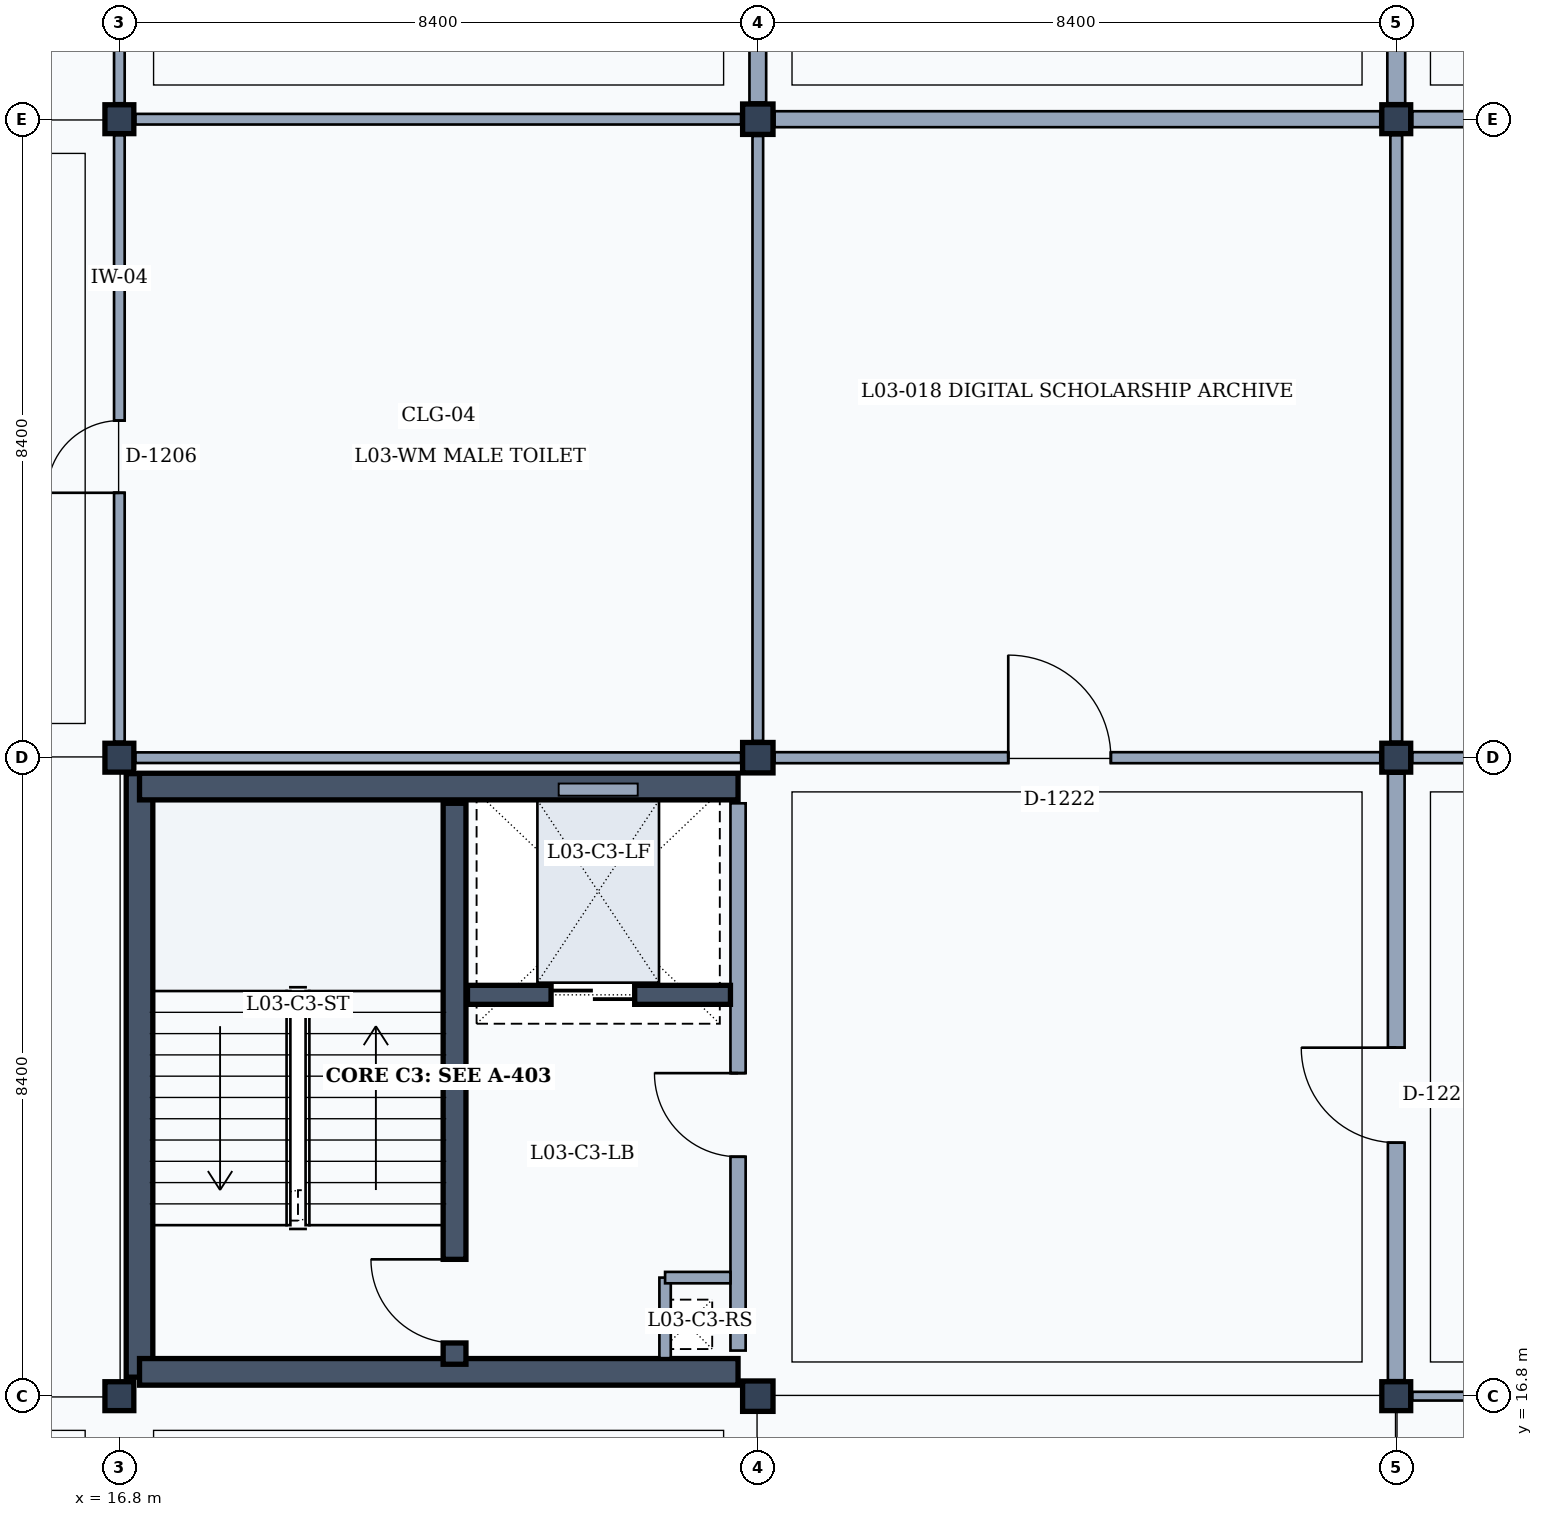
"""IFC4 building model, lengths in metres.
Left out: names, types, materials, properties, quantities, classifications, styles, units other than length and angle.
Written with IfcOpenShell. Run it as: python <this file> out.ifc"""

import sys

from ifc_helpers import new_model, si_unit, direction, frame, frame_2d, origin, origin_2d, place, context, subcontext, project, spatial, rectangle, extrude, element, fill, save


model = new_model("IFC4")
c1 = context("Model", 3, precision=1e-05, world=origin(), true_north=direction((0.0, 1.0)))
c2 = subcontext(c1, "Body", "Model", "MODEL_VIEW")
j1 = project(units=[si_unit("LENGTHUNIT", "METRE"), si_unit("PLANEANGLEUNIT", "RADIAN")], contexts=[c1])
p1 = place(None, origin())
s1 = spatial("IfcSite", under=j1, at=p1, CompositionType="ELEMENT")
p2 = place(p1, origin())
s2 = spatial("IfcBuilding", under=s1, at=p2, CompositionType="ELEMENT")
p3 = place(p2, frame((0.0, 0.0, 13.8)))
s3 = spatial("IfcBuildingStorey", under=s2, at=p3, CompositionType="ELEMENT", Elevation=13.8)
for number, where, z_axis, x_axis in (
    (1, (16.8, 16.8, 0.0), (0.0, 0.0, 1.0), (1.0, 0.0, 0.0)),
    (2, (16.8, 25.2, 0.0), (0.0, 0.0, 1.0), (1.0, 0.0, 0.0)),
    (3, (16.8, 33.6, 0.0), (0.0, 0.0, 1.0), (1.0, 0.0, 0.0)),
):
    element("IfcColumn", number, at=place(p3, frame(where, z_axis=z_axis, x_axis=x_axis)), inside=s3, PredefinedType="COLUMN", context=c2, shape_type="SweptSolid", body=[
        extrude(rectangle(XDim=0.38, YDim=0.38, at=origin_2d()), origin(), (0.0, 0.0, 1.0), 4.2),
    ])
for number, where, z_axis, x_axis in (
    (4, (25.2, 16.8, 0.0), (0.0, 0.0, 1.0), (1.0, 0.0, 0.0)),
    (5, (25.2, 25.2, 0.0), (0.0, 0.0, 1.0), (1.0, 0.0, 0.0)),
    (6, (25.2, 33.6, 0.0), (0.0, 0.0, 1.0), (1.0, 0.0, 0.0)),
):
    element("IfcColumn", number, at=place(p3, frame(where, z_axis=z_axis, x_axis=x_axis)), inside=s3, PredefinedType="COLUMN", context=c2, shape_type="SweptSolid", body=[
        extrude(rectangle(XDim=0.4, YDim=0.4, at=origin_2d()), origin(), (0.0, 0.0, 1.0), 4.2),
    ])
for number, where, z_axis, x_axis in (
    (7, (33.6, 16.8, 0.0), (0.0, 0.0, 1.0), (1.0, 0.0, 0.0)),
    (8, (33.6, 25.2, 0.0), (0.0, 0.0, 1.0), (1.0, 0.0, 0.0)),
    (9, (33.6, 33.6, 0.0), (0.0, 0.0, 1.0), (1.0, 0.0, 0.0)),
):
    element("IfcColumn", number, at=place(p3, frame(where, z_axis=z_axis, x_axis=x_axis)), inside=s3, PredefinedType="COLUMN", context=c2, shape_type="SweptSolid", body=[
        extrude(rectangle(XDim=0.38, YDim=0.38, at=origin_2d()), origin(), (0.0, 0.0, 1.0), 4.2),
    ])
p4 = place(p3, frame((17.065, 17.05, 0.0), z_axis=(0.0, 0.0, 1.0), x_axis=(0.0, 1.0, 0.0)))
e10 = element("IfcWall", 10, at=p4, inside=s3, PredefinedType="SHEAR", context=c2, shape_type="SweptSolid", body=[
    extrude(rectangle(XDim=7.94, YDim=0.35, at=frame_2d((3.97, 0.0))), origin(), (0.0, 0.0, 1.0), 3.93),
])
p5 = place(p3, frame((17.065, 24.82, 0.0), z_axis=(0.0, 0.0, 1.0), x_axis=(1.0, 0.0, 0.0)))
e11 = element("IfcWall", 11, at=p5, inside=s3, PredefinedType="SHEAR", context=c2, shape_type="SweptSolid", body=[
    extrude(rectangle(XDim=7.875, YDim=0.35, at=frame_2d((3.938, 0.0))), origin(), (0.0, 0.0, 1.0), 3.93),
])
p6 = place(p3, frame((24.94, 24.6, 0.0), z_axis=(0.0, 0.0, 1.0), x_axis=(0.0, -1.0, 0.0)))
e12 = element("IfcWall", 12, at=p6, inside=s3, PredefinedType="PARTITIONING", context=c2, shape_type="SweptSolid", body=[
    extrude(rectangle(XDim=7.2, YDim=0.2, at=frame_2d((3.6, 0.0))), origin(), (0.0, 0.0, 1.0), 3.32),
])
p7 = place(p6, frame((3.55, 0.0, 0.0)))
e13 = element("IfcOpeningElement", 13, at=p7, cuts=e12, PredefinedType="OPENING", context=c2, shape_type="SweptSolid", body=[
    extrude(rectangle(XDim=1.1, YDim=2.15, at=frame_2d((0.55, 1.075))), frame((0.0, 0.11, 0.0), z_axis=(0.0, -1.0, 0.0), x_axis=(1.0, 0.0, 0.0)), (0.0, 0.0, 1.0), 0.22),
])
p8 = place(p3, frame((24.94, 17.12, 0.0), z_axis=(0.0, 0.0, 1.0), x_axis=(-1.0, 0.0, 0.0)))
e14 = element("IfcWall", 14, at=p8, inside=s3, PredefinedType="SHEAR", context=c2, shape_type="SweptSolid", body=[
    extrude(rectangle(XDim=7.875, YDim=0.35, at=frame_2d((3.938, 0.0))), origin(), (0.0, 0.0, 1.0), 3.93),
])
p9 = place(p3, frame((21.21, 17.22, 0.0), z_axis=(0.0, 0.0, 1.0), x_axis=(0.0, 1.0, 0.0)))
e15 = element("IfcWall", 15, at=p9, inside=s3, PredefinedType="SHEAR", context=c2, shape_type="SweptSolid", body=[
    extrude(rectangle(XDim=7.38, YDim=0.3, at=frame_2d((3.69, 0.0))), origin(), (0.0, 0.0, 1.0), 3.93),
])
p10 = place(p9, frame((0.28, 0.0, 0.0)))
e16 = element("IfcOpeningElement", 16, at=p10, cuts=e15, PredefinedType="OPENING", context=c2, shape_type="SweptSolid", body=[
    extrude(rectangle(XDim=1.1, YDim=2.15, at=frame_2d((0.55, 1.075))), frame((0.0, 0.16, 0.0), z_axis=(0.0, -1.0, 0.0), x_axis=(1.0, 0.0, 0.0)), (0.0, 0.0, 1.0), 0.32),
])
p11 = place(p3, frame((23.98, 18.36, 0.0), z_axis=(0.0, 0.0, 1.0), x_axis=(0.0, -1.0, 0.0)))
e17 = element("IfcWall", 17, at=p11, inside=s3, PredefinedType="PARTITIONING", context=c2, shape_type="SweptSolid", body=[
    extrude(rectangle(XDim=1.06, YDim=0.15, at=frame_2d((0.53, 0.0))), origin(), (0.0, 0.0, 1.0), 3.32),
])
p12 = place(p3, frame((23.98, 18.36, 0.0), z_axis=(0.0, 0.0, 1.0), x_axis=(1.0, 0.0, 0.0)))
e18 = element("IfcWall", 18, at=p12, inside=s3, PredefinedType="PARTITIONING", context=c2, shape_type="SweptSolid", body=[
    extrude(rectangle(XDim=0.86, YDim=0.15, at=frame_2d((0.43, 0.0))), origin(), (0.0, 0.0, 1.0), 3.32),
])
p13 = place(p3, frame((21.38, 22.08, 0.0), z_axis=(0.0, 0.0, 1.0), x_axis=(1.0, 0.0, 0.0)))
e19 = element("IfcWall", 19, at=p13, inside=s3, PredefinedType="SHEAR", context=c2, shape_type="SweptSolid", body=[
    extrude(rectangle(XDim=3.46, YDim=0.25, at=frame_2d((1.73, 0.0))), origin(), (0.0, 0.0, 1.0), 3.93),
])
p14 = place(p13, frame((1.1, 0.0, 0.0)))
e20 = element("IfcOpeningElement", 20, at=p14, cuts=e19, PredefinedType="OPENING", context=c2, shape_type="SweptSolid", body=[
    extrude(rectangle(XDim=1.1, YDim=2.15, at=frame_2d((0.55, 1.075))), frame((0.0, 0.135, 0.0), z_axis=(0.0, -1.0, 0.0), x_axis=(1.0, 0.0, 0.0)), (0.0, 0.0, 1.0), 0.27),
])
p15 = place(p3, frame((16.8, 25.41, 0.0), z_axis=(0.0, 0.0, 1.0), x_axis=(0.0, 1.0, 0.0)))
e21 = element("IfcWall", 21, at=p15, inside=s3, PredefinedType="PARTITIONING", context=c2, shape_type="SweptSolid", body=[
    extrude(rectangle(XDim=7.98, YDim=0.14, at=frame_2d((3.99, 0.0))), origin(), (0.0, 0.0, 1.0), 3.32),
])
p16 = place(p15, frame((3.275, 0.0, 0.0)))
e22 = element("IfcOpeningElement", 22, at=p16, cuts=e21, PredefinedType="OPENING", context=c2, shape_type="SweptSolid", body=[
    extrude(rectangle(XDim=0.95, YDim=2.15, at=frame_2d((0.475, 1.075))), frame((0.0, 0.08, 0.0), z_axis=(0.0, -1.0, 0.0), x_axis=(1.0, 0.0, 0.0)), (0.0, 0.0, 1.0), 0.16),
])
p17 = place(p3, frame((16.8, 33.81, 0.0), z_axis=(0.0, 0.0, 1.0), x_axis=(0.0, 1.0, 0.0)))
e23 = element("IfcWall", 23, at=p17, inside=s3, PredefinedType="PARTITIONING", context=c2, shape_type="SweptSolid", body=[
    extrude(rectangle(XDim=8.0, YDim=0.14, at=frame_2d((4.0, 0.0))), origin(), (0.0, 0.0, 1.0), 3.32),
])
p18 = place(p17, frame((3.25, 0.0, 0.0)))
e24 = element("IfcOpeningElement", 24, at=p18, cuts=e23, PredefinedType="OPENING", context=c2, shape_type="SweptSolid", body=[
    extrude(rectangle(XDim=1.0, YDim=2.15, at=frame_2d((0.5, 1.075))), frame((0.0, 0.08, 0.0), z_axis=(0.0, -1.0, 0.0), x_axis=(1.0, 0.0, 0.0)), (0.0, 0.0, 1.0), 0.16),
])
p19 = place(p3, frame((17.01, 25.2, 0.0), z_axis=(0.0, 0.0, 1.0), x_axis=(1.0, 0.0, 0.0)))
e25 = element("IfcWall", 25, at=p19, inside=s3, PredefinedType="PARTITIONING", context=c2, shape_type="SweptSolid", body=[
    extrude(rectangle(XDim=7.97, YDim=0.14, at=frame_2d((3.985, 0.0))), origin(), (0.0, 0.0, 1.0), 3.32),
])
p20 = place(p3, frame((25.2, 25.42, 0.0), z_axis=(0.0, 0.0, 1.0), x_axis=(0.0, 1.0, 0.0)))
e26 = element("IfcWall", 26, at=p20, inside=s3, PredefinedType="PARTITIONING", context=c2, shape_type="SweptSolid", body=[
    extrude(rectangle(XDim=7.96, YDim=0.14, at=frame_2d((3.98, 0.0))), origin(), (0.0, 0.0, 1.0), 3.32),
])
p21 = place(p3, frame((17.01, 33.6, 0.0), z_axis=(0.0, 0.0, 1.0), x_axis=(1.0, 0.0, 0.0)))
e27 = element("IfcWall", 27, at=p21, inside=s3, PredefinedType="PARTITIONING", context=c2, shape_type="SweptSolid", body=[
    extrude(rectangle(XDim=7.97, YDim=0.14, at=frame_2d((3.985, 0.0))), origin(), (0.0, 0.0, 1.0), 3.32),
])
p22 = place(p3, frame((25.2, 33.82, 0.0), z_axis=(0.0, 0.0, 1.0), x_axis=(0.0, 1.0, 0.0)))
e28 = element("IfcWall", 28, at=p22, inside=s3, PredefinedType="PARTITIONING", context=c2, shape_type="SweptSolid", body=[
    extrude(rectangle(XDim=7.99, YDim=0.22, at=frame_2d((3.995, 0.0))), origin(), (0.0, 0.0, 1.0), 3.32),
])
p23 = place(p22, frame((3.0, 0.0, 0.0)))
e29 = element("IfcOpeningElement", 29, at=p23, cuts=e28, PredefinedType="OPENING", context=c2, shape_type="SweptSolid", body=[
    extrude(rectangle(XDim=1.5, YDim=2.3, at=frame_2d((0.75, 1.15))), frame((0.0, 0.12, 0.0), z_axis=(0.0, -1.0, 0.0), x_axis=(1.0, 0.0, 0.0)), (0.0, 0.0, 1.0), 0.24),
])
p24 = place(p3, frame((33.6, 17.01, 0.0), z_axis=(0.0, 0.0, 1.0), x_axis=(0.0, 1.0, 0.0)))
e30 = element("IfcWall", 30, at=p24, inside=s3, PredefinedType="PARTITIONING", context=c2, shape_type="SweptSolid", body=[
    extrude(rectangle(XDim=7.98, YDim=0.22, at=frame_2d((3.99, 0.0))), origin(), (0.0, 0.0, 1.0), 3.32),
])
p25 = place(p24, frame((3.125, 0.0, 0.0)))
e31 = element("IfcOpeningElement", 31, at=p25, cuts=e30, PredefinedType="OPENING", context=c2, shape_type="SweptSolid", body=[
    extrude(rectangle(XDim=1.25, YDim=2.3, at=frame_2d((0.625, 1.15))), frame((0.0, 0.12, 0.0), z_axis=(0.0, -1.0, 0.0), x_axis=(1.0, 0.0, 0.0)), (0.0, 0.0, 1.0), 0.24),
])
p26 = place(p3, frame((25.42, 25.2, 0.0), z_axis=(0.0, 0.0, 1.0), x_axis=(1.0, 0.0, 0.0)))
e32 = element("IfcWall", 32, at=p26, inside=s3, PredefinedType="PARTITIONING", context=c2, shape_type="SweptSolid", body=[
    extrude(rectangle(XDim=7.97, YDim=0.145, at=frame_2d((3.985, 0.0))), origin(), (0.0, 0.0, 1.0), 3.32),
])
p27 = place(p26, frame((3.075, 0.0, 0.0)))
e33 = element("IfcOpeningElement", 33, at=p27, cuts=e32, PredefinedType="OPENING", context=c2, shape_type="SweptSolid", body=[
    extrude(rectangle(XDim=1.35, YDim=2.25, at=frame_2d((0.675, 1.125))), frame((0.0, 0.083, 0.0), z_axis=(0.0, -1.0, 0.0), x_axis=(1.0, 0.0, 0.0)), (0.0, 0.0, 1.0), 0.165),
])
p28 = place(p3, frame((33.6, 25.41, 0.0), z_axis=(0.0, 0.0, 1.0), x_axis=(0.0, 1.0, 0.0)))
e34 = element("IfcWall", 34, at=p28, inside=s3, PredefinedType="PARTITIONING", context=c2, shape_type="SweptSolid", body=[
    extrude(rectangle(XDim=7.98, YDim=0.155, at=frame_2d((3.99, 0.0))), origin(), (0.0, 0.0, 1.0), 3.32),
])
p29 = place(p3, frame((25.42, 33.6, 0.0), z_axis=(0.0, 0.0, 1.0), x_axis=(1.0, 0.0, 0.0)))
e35 = element("IfcWall", 35, at=p29, inside=s3, PredefinedType="PARTITIONING", context=c2, shape_type="SweptSolid", body=[
    extrude(rectangle(XDim=7.97, YDim=0.21, at=frame_2d((3.985, 0.0))), origin(), (0.0, 0.0, 1.0), 3.32),
])
p30 = place(p3, frame((33.6, 33.81, 0.0), z_axis=(0.0, 0.0, 1.0), x_axis=(0.0, 1.0, 0.0)))
e36 = element("IfcWall", 36, at=p30, inside=s3, PredefinedType="PARTITIONING", context=c2, shape_type="SweptSolid", body=[
    extrude(rectangle(XDim=8.0, YDim=0.235, at=frame_2d((4.0, 0.0))), origin(), (0.0, 0.0, 1.0), 3.32),
])
p31 = place(p30, frame((3.025, 0.0, 0.0)))
e37 = element("IfcOpeningElement", 37, at=p31, cuts=e36, PredefinedType="OPENING", context=c2, shape_type="SweptSolid", body=[
    extrude(rectangle(XDim=1.45, YDim=2.35, at=frame_2d((0.725, 1.175))), frame((0.0, 0.127, 0.0), z_axis=(0.0, -1.0, 0.0), x_axis=(1.0, 0.0, 0.0)), (0.0, 0.0, 1.0), 0.255),
])
p32 = place(p3, frame((33.81, 16.8, 0.0), z_axis=(0.0, 0.0, 1.0), x_axis=(1.0, 0.0, 0.0)))
e38 = element("IfcWall", 38, at=p32, inside=s3, PredefinedType="PARTITIONING", context=c2, shape_type="SweptSolid", body=[
    extrude(rectangle(XDim=7.97, YDim=0.115, at=frame_2d((3.985, 0.0))), origin(), (0.0, 0.0, 1.0), 3.32),
])
p33 = place(p3, frame((33.81, 25.2, 0.0), z_axis=(0.0, 0.0, 1.0), x_axis=(1.0, 0.0, 0.0)))
e39 = element("IfcWall", 39, at=p33, inside=s3, PredefinedType="PARTITIONING", context=c2, shape_type="SweptSolid", body=[
    extrude(rectangle(XDim=7.97, YDim=0.145, at=frame_2d((3.985, 0.0))), origin(), (0.0, 0.0, 1.0), 3.32),
])
p34 = place(p33, frame((3.15, 0.0, 0.0)))
e40 = element("IfcOpeningElement", 40, at=p34, cuts=e39, PredefinedType="OPENING", context=c2, shape_type="SweptSolid", body=[
    extrude(rectangle(XDim=1.2, YDim=2.2, at=frame_2d((0.6, 1.1))), frame((0.0, 0.083, 0.0), z_axis=(0.0, -1.0, 0.0), x_axis=(1.0, 0.0, 0.0)), (0.0, 0.0, 1.0), 0.165),
])
p35 = place(p3, frame((33.81, 33.6, 0.0), z_axis=(0.0, 0.0, 1.0), x_axis=(1.0, 0.0, 0.0)))
e41 = element("IfcWall", 41, at=p35, inside=s3, PredefinedType="PARTITIONING", context=c2, shape_type="SweptSolid", body=[
    extrude(rectangle(XDim=7.97, YDim=0.21, at=frame_2d((3.985, 0.0))), origin(), (0.0, 0.0, 1.0), 3.32),
])
p36 = place(p7, frame((1.1, 0.0, 0.0), z_axis=(0.0, 0.0, 1.0), x_axis=(-1.0, 0.0, 0.0)))
e42 = element("IfcDoor", 42, at=p36, inside=s3, OperationType="SINGLE_SWING_RIGHT", PredefinedType="DOOR", context=c2, shape_type="SweptSolid", body=[
    extrude(rectangle(XDim=1.1, YDim=2.15, at=frame_2d((0.55, 1.075))), frame((0.0, 0.025, 0.0), z_axis=(0.0, -1.0, 0.0), x_axis=(1.0, 0.0, 0.0)), (0.0, 0.0, 1.0), 0.05),
])
fill(e13, e42)
p37 = place(p10, origin())
e43 = element("IfcDoor", 43, at=p37, inside=s3, OperationType="SINGLE_SWING_RIGHT", PredefinedType="DOOR", context=c2, shape_type="SweptSolid", body=[
    extrude(rectangle(XDim=1.1, YDim=2.15, at=frame_2d((0.55, 1.075))), frame((0.0, 0.025, 0.0), z_axis=(0.0, -1.0, 0.0), x_axis=(1.0, 0.0, 0.0)), (0.0, 0.0, 1.0), 0.05),
])
fill(e16, e43)
p38 = place(p14, origin())
e44 = element("IfcDoor", 44, at=p38, inside=s3, OperationType="DOUBLE_DOOR_SLIDING", PredefinedType="DOOR", context=c2, shape_type="SweptSolid", body=[
    extrude(rectangle(XDim=1.1, YDim=2.15, at=frame_2d((0.55, 1.075))), frame((0.0, 0.025, 0.0), z_axis=(0.0, -1.0, 0.0), x_axis=(1.0, 0.0, 0.0)), (0.0, 0.0, 1.0), 0.05),
])
fill(e20, e44)
p39 = place(p16, origin())
e45 = element("IfcDoor", 45, at=p39, inside=s3, OperationType="SINGLE_SWING_LEFT", PredefinedType="DOOR", context=c2, shape_type="SweptSolid", body=[
    extrude(rectangle(XDim=0.95, YDim=2.15, at=frame_2d((0.475, 1.075))), frame((0.0, 0.025, 0.0), z_axis=(0.0, -1.0, 0.0), x_axis=(1.0, 0.0, 0.0)), (0.0, 0.0, 1.0), 0.05),
])
fill(e22, e45)
p40 = place(p25, origin())
e46 = element("IfcDoor", 46, at=p40, inside=s3, OperationType="SINGLE_SWING_RIGHT", PredefinedType="DOOR", context=c2, shape_type="SweptSolid", body=[
    extrude(rectangle(XDim=1.25, YDim=2.3, at=frame_2d((0.625, 1.15))), frame((0.0, 0.025, 0.0), z_axis=(0.0, -1.0, 0.0), x_axis=(1.0, 0.0, 0.0)), (0.0, 0.0, 1.0), 0.05),
])
fill(e31, e46)
p41 = place(p27, origin())
e47 = element("IfcDoor", 47, at=p41, inside=s3, OperationType="SINGLE_SWING_LEFT", PredefinedType="DOOR", context=c2, shape_type="SweptSolid", body=[
    extrude(rectangle(XDim=1.35, YDim=2.25, at=frame_2d((0.675, 1.125))), frame((0.0, 0.025, 0.0), z_axis=(0.0, -1.0, 0.0), x_axis=(1.0, 0.0, 0.0)), (0.0, 0.0, 1.0), 0.05),
])
fill(e33, e47)
save(model, sys.argv[1])
